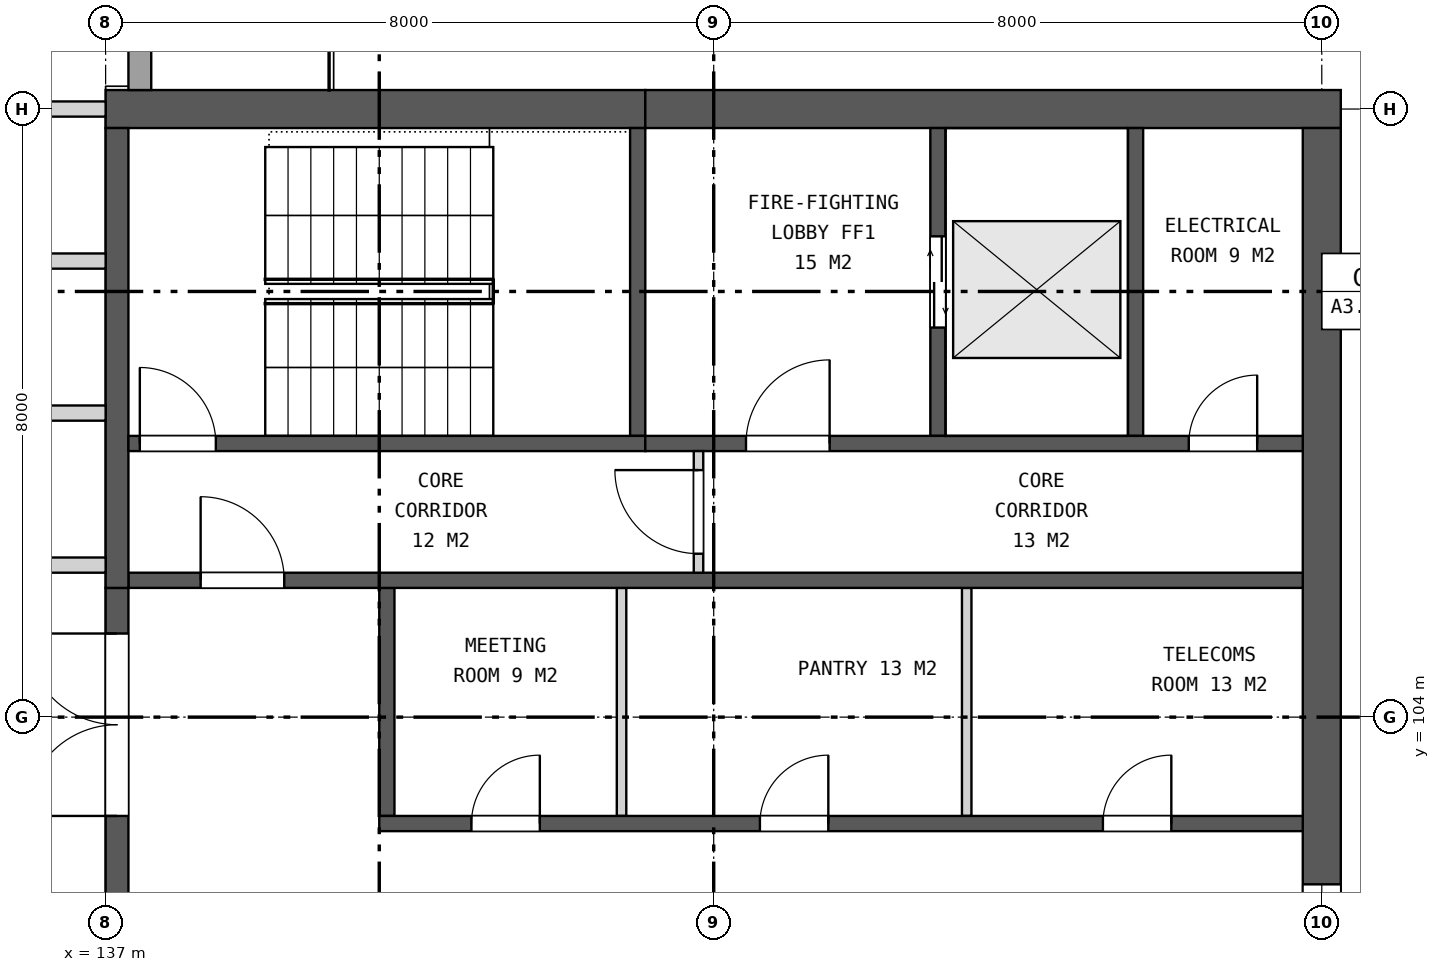
"""IFC4 building model, lengths in metres.
Left out: names, types, materials, properties, quantities, classifications, styles, units other than length and angle.
Written with IfcOpenShell. Run it as: python <this file> out.ifc"""

import sys

from ifc_helpers import new_model, si_unit, direction, frame, frame_2d, origin, place, context, subcontext, project, spatial, rectangle, extrude, element, fill, save


model = new_model("IFC4")
c1 = context("Model", 3, precision=1e-05, world=origin(), true_north=direction((0.0, 1.0)))
c2 = subcontext(c1, "Body", "Model", "MODEL_VIEW")
j1 = project(units=[si_unit("LENGTHUNIT", "METRE"), si_unit("PLANEANGLEUNIT", "RADIAN")], contexts=[c1])
p1 = place(None, origin())
s1 = spatial("IfcSite", under=j1, at=p1, CompositionType="ELEMENT")
p2 = place(p1, origin())
s2 = spatial("IfcBuilding", under=s1, at=p2, CompositionType="ELEMENT")
p3 = place(p2, frame((0.0, 0.0, 245.1)))
s3 = spatial("IfcBuildingStorey", under=s2, at=p3, CompositionType="ELEMENT", Elevation=245.1)
p4 = place(p3, frame((137.0, 112.0, 0.0), z_axis=(0.0, 0.0, 1.0), x_axis=(1.0, 0.0, 0.0)))
e1 = element("IfcWall", 1, at=p4, inside=s3, PredefinedType="SHEAR", context=c2, shape_type="SweptSolid", body=[
    extrude(rectangle(XDim=7.1, YDim=0.5, at=frame_2d((3.55, 0.0))), origin(), (0.0, 0.0, 1.0), 4.2),
])
p5 = place(p3, frame((144.1, 112.0, 0.0), z_axis=(0.0, 0.0, 1.0), x_axis=(1.0, 0.0, 0.0)))
e2 = element("IfcWall", 2, at=p5, inside=s3, PredefinedType="SHEAR", context=c2, shape_type="SweptSolid", body=[
    extrude(rectangle(XDim=9.15, YDim=0.5, at=frame_2d((4.575, 0.0))), origin(), (0.0, 0.0, 1.0), 4.2),
])
p6 = place(p3, frame((153.0, 88.25, 0.0), z_axis=(0.0, 0.0, 1.0), x_axis=(0.0, 1.0, 0.0)))
e3 = element("IfcWall", 3, at=p6, inside=s3, PredefinedType="SHEAR", context=c2, shape_type="SweptSolid", body=[
    extrude(rectangle(XDim=23.5, YDim=0.5, at=frame_2d((11.75, 0.0))), origin(), (0.0, 0.0, 1.0), 4.2),
])
p7 = place(p6, frame((9.95, 0.0, 0.15)))
e4 = element("IfcOpeningElement", 4, at=p7, cuts=e3, PredefinedType="OPENING", context=c2, shape_type="SweptSolid", body=[
    extrude(rectangle(XDim=3.6, YDim=3.0, at=frame_2d((1.8, 1.5))), frame((0.0, 0.26, 0.0), z_axis=(0.0, -1.0, 0.0), x_axis=(1.0, 0.0, 0.0)), (0.0, 0.0, 1.0), 0.52),
])
p8 = place(p3, frame((137.15, 94.3, 0.0), z_axis=(0.0, 0.0, 1.0), x_axis=(0.0, 1.0, 0.0)))
e5 = element("IfcWall", 5, at=p8, inside=s3, PredefinedType="SHEAR", context=c2, shape_type="SweptSolid", body=[
    extrude(rectangle(XDim=11.4, YDim=0.3, at=frame_2d((5.7, 0.0))), origin(), (0.0, 0.0, 1.0), 4.2),
])
p9 = place(p8, frame((0.6, 0.0, 0.0)))
e6 = element("IfcOpeningElement", 6, at=p9, cuts=e5, PredefinedType="OPENING", context=c2, shape_type="SweptSolid", body=[
    extrude(rectangle(XDim=2.4, YDim=2.4, at=frame_2d((1.2, 1.2))), frame((0.0, 0.16, 0.0), z_axis=(0.0, -1.0, 0.0), x_axis=(1.0, 0.0, 0.0)), (0.0, 0.0, 1.0), 0.32),
])
p10 = place(p8, frame((4.5, 0.0, 0.0)))
e7 = element("IfcOpeningElement", 7, at=p10, cuts=e5, PredefinedType="OPENING", context=c2, shape_type="SweptSolid", body=[
    extrude(rectangle(XDim=2.4, YDim=2.4, at=frame_2d((1.2, 1.2))), frame((0.0, 0.16, 0.0), z_axis=(0.0, -1.0, 0.0), x_axis=(1.0, 0.0, 0.0)), (0.0, 0.0, 1.0), 0.32),
])
p11 = place(p8, frame((8.4, 0.0, 0.0)))
e8 = element("IfcOpeningElement", 8, at=p11, cuts=e5, PredefinedType="OPENING", context=c2, shape_type="SweptSolid", body=[
    extrude(rectangle(XDim=2.4, YDim=2.4, at=frame_2d((1.2, 1.2))), frame((0.0, 0.16, 0.0), z_axis=(0.0, -1.0, 0.0), x_axis=(1.0, 0.0, 0.0)), (0.0, 0.0, 1.0), 0.32),
])
p12 = place(p3, frame((140.7, 102.7, 0.0), z_axis=(0.0, 0.0, 1.0), x_axis=(0.0, 1.0, 0.0)))
e9 = element("IfcWall", 9, at=p12, inside=s3, PredefinedType="SHEAR", context=c2, shape_type="SweptSolid", body=[
    extrude(rectangle(XDim=3.0, YDim=0.2, at=frame_2d((1.5, 0.0))), origin(), (0.0, 0.0, 1.0), 4.2),
])
for number, where, z_axis, x_axis in (
    (10, (143.788, 102.7, 0.0), (0.0, 0.0, 1.0), (0.0, 1.0, 0.0)),
    (11, (148.329, 102.7, 0.0), (0.0, 0.0, 1.0), (0.0, 1.0, 0.0)),
):
    element("IfcWall", number, at=place(p3, frame(where, z_axis=z_axis, x_axis=x_axis)), inside=s3, PredefinedType="PARTITIONING", context=c2, shape_type="SweptSolid", body=[
        extrude(rectangle(XDim=3.0, YDim=0.125, at=frame_2d((1.5, 0.0))), origin(), (0.0, 0.0, 1.0), 4.2),
    ])
p13 = place(p3, frame((140.6, 102.6, 0.0), z_axis=(0.0, 0.0, 1.0), x_axis=(1.0, 0.0, 0.0)))
e12 = element("IfcWall", 12, at=p13, inside=s3, PredefinedType="SHEAR", context=c2, shape_type="SweptSolid", body=[
    extrude(rectangle(XDim=12.15, YDim=0.2, at=frame_2d((6.075, 0.0))), origin(), (0.0, 0.0, 1.0), 4.2),
])
p14 = place(p13, frame((1.212, 0.0, 0.0)))
e13 = element("IfcOpeningElement", 13, at=p14, cuts=e12, PredefinedType="OPENING", context=c2, shape_type="SweptSolid", body=[
    extrude(rectangle(XDim=0.9, YDim=2.1, at=frame_2d((0.45, 1.05))), frame((0.0, 0.11, 0.0), z_axis=(0.0, -1.0, 0.0), x_axis=(1.0, 0.0, 0.0)), (0.0, 0.0, 1.0), 0.22),
])
p15 = place(p13, frame((5.008, 0.0, 0.0)))
e14 = element("IfcOpeningElement", 14, at=p15, cuts=e12, PredefinedType="OPENING", context=c2, shape_type="SweptSolid", body=[
    extrude(rectangle(XDim=0.9, YDim=2.1, at=frame_2d((0.45, 1.05))), frame((0.0, 0.11, 0.0), z_axis=(0.0, -1.0, 0.0), x_axis=(1.0, 0.0, 0.0)), (0.0, 0.0, 1.0), 0.22),
])
p16 = place(p13, frame((9.521, 0.0, 0.0)))
e15 = element("IfcOpeningElement", 15, at=p16, cuts=e12, PredefinedType="OPENING", context=c2, shape_type="SweptSolid", body=[
    extrude(rectangle(XDim=0.9, YDim=2.1, at=frame_2d((0.45, 1.05))), frame((0.0, 0.11, 0.0), z_axis=(0.0, -1.0, 0.0), x_axis=(1.0, 0.0, 0.0)), (0.0, 0.0, 1.0), 0.22),
])
p17 = place(p3, frame((137.3, 105.8, 0.0), z_axis=(0.0, 0.0, 1.0), x_axis=(1.0, 0.0, 0.0)))
e16 = element("IfcWall", 16, at=p17, inside=s3, PredefinedType="SHEAR", context=c2, shape_type="SweptSolid", body=[
    extrude(rectangle(XDim=15.45, YDim=0.2, at=frame_2d((7.725, 0.0))), origin(), (0.0, 0.0, 1.0), 4.2),
])
p18 = place(p17, frame((0.95, 0.0, 0.0)))
e17 = element("IfcOpeningElement", 17, at=p18, cuts=e16, PredefinedType="OPENING", context=c2, shape_type="SweptSolid", body=[
    extrude(rectangle(XDim=1.1, YDim=2.1, at=frame_2d((0.55, 1.05))), frame((0.0, 0.11, 0.0), z_axis=(0.0, -1.0, 0.0), x_axis=(1.0, 0.0, 0.0)), (0.0, 0.0, 1.0), 0.22),
])
p19 = place(p3, frame((137.15, 105.7, 0.0), z_axis=(0.0, 0.0, 1.0), x_axis=(0.0, 1.0, 0.0)))
e18 = element("IfcWall", 18, at=p19, inside=s3, PredefinedType="SHEAR", context=c2, shape_type="SweptSolid", body=[
    extrude(rectangle(XDim=6.05, YDim=0.3, at=frame_2d((3.025, 0.0))), origin(), (0.0, 0.0, 1.0), 4.2),
])
p20 = place(p3, frame((144.0, 107.7, 0.0), z_axis=(0.0, 0.0, 1.0), x_axis=(0.0, 1.0, 0.0)))
e19 = element("IfcWall", 19, at=p20, inside=s3, PredefinedType="SHEAR", context=c2, shape_type="SweptSolid", body=[
    extrude(rectangle(XDim=4.05, YDim=0.2, at=frame_2d((2.025, 0.0))), origin(), (0.0, 0.0, 1.0), 4.2),
])
p21 = place(p3, frame((147.95, 107.7, 0.0), z_axis=(0.0, 0.0, 1.0), x_axis=(0.0, 1.0, 0.0)))
e20 = element("IfcWall", 20, at=p21, inside=s3, PredefinedType="SHEAR", context=c2, shape_type="SweptSolid", body=[
    extrude(rectangle(XDim=4.05, YDim=0.2, at=frame_2d((2.025, 0.0))), origin(), (0.0, 0.0, 1.0), 4.2),
])
p22 = place(p21, frame((1.425, 0.0, 0.0)))
e21 = element("IfcOpeningElement", 21, at=p22, cuts=e20, PredefinedType="OPENING", context=c2, shape_type="SweptSolid", body=[
    extrude(rectangle(XDim=1.2, YDim=2.1, at=frame_2d((0.6, 1.05))), frame((0.0, 0.11, 0.0), z_axis=(0.0, -1.0, 0.0), x_axis=(1.0, 0.0, 0.0)), (0.0, 0.0, 1.0), 0.22),
])
p23 = place(p3, frame((150.55, 107.7, 0.0), z_axis=(0.0, 0.0, 1.0), x_axis=(0.0, 1.0, 0.0)))
e22 = element("IfcWall", 22, at=p23, inside=s3, PredefinedType="SHEAR", context=c2, shape_type="SweptSolid", body=[
    extrude(rectangle(XDim=4.05, YDim=0.2, at=frame_2d((2.025, 0.0))), origin(), (0.0, 0.0, 1.0), 4.2),
])
p24 = place(p3, frame((137.3, 107.6, 0.0), z_axis=(0.0, 0.0, 1.0), x_axis=(1.0, 0.0, 0.0)))
e23 = element("IfcWall", 23, at=p24, inside=s3, PredefinedType="SHEAR", context=c2, shape_type="SweptSolid", body=[
    extrude(rectangle(XDim=6.8, YDim=0.2, at=frame_2d((3.4, 0.0))), origin(), (0.0, 0.0, 1.0), 4.2),
])
p25 = place(p24, frame((0.15, 0.0, 0.0)))
e24 = element("IfcOpeningElement", 24, at=p25, cuts=e23, PredefinedType="OPENING", context=c2, shape_type="SweptSolid", body=[
    extrude(rectangle(XDim=1.0, YDim=2.1, at=frame_2d((0.5, 1.05))), frame((0.0, 0.11, 0.0), z_axis=(0.0, -1.0, 0.0), x_axis=(1.0, 0.0, 0.0)), (0.0, 0.0, 1.0), 0.22),
])
p26 = place(p3, frame((144.1, 107.6, 0.0), z_axis=(0.0, 0.0, 1.0), x_axis=(1.0, 0.0, 0.0)))
e25 = element("IfcWall", 25, at=p26, inside=s3, PredefinedType="SHEAR", context=c2, shape_type="SweptSolid", body=[
    extrude(rectangle(XDim=8.65, YDim=0.2, at=frame_2d((4.325, 0.0))), origin(), (0.0, 0.0, 1.0), 4.2),
])
p27 = place(p26, frame((1.325, 0.0, 0.0)))
e26 = element("IfcOpeningElement", 26, at=p27, cuts=e25, PredefinedType="OPENING", context=c2, shape_type="SweptSolid", body=[
    extrude(rectangle(XDim=1.1, YDim=2.1, at=frame_2d((0.55, 1.05))), frame((0.0, 0.11, 0.0), z_axis=(0.0, -1.0, 0.0), x_axis=(1.0, 0.0, 0.0)), (0.0, 0.0, 1.0), 0.22),
])
p28 = place(p26, frame((7.15, 0.0, 0.0)))
e27 = element("IfcOpeningElement", 27, at=p28, cuts=e25, PredefinedType="OPENING", context=c2, shape_type="SweptSolid", body=[
    extrude(rectangle(XDim=0.9, YDim=2.1, at=frame_2d((0.45, 1.05))), frame((0.0, 0.11, 0.0), z_axis=(0.0, -1.0, 0.0), x_axis=(1.0, 0.0, 0.0)), (0.0, 0.0, 1.0), 0.22),
])
p29 = place(p3, frame((144.8, 105.9, 0.0), z_axis=(0.0, 0.0, 1.0), x_axis=(0.0, 1.0, 0.0)))
e28 = element("IfcWall", 28, at=p29, inside=s3, PredefinedType="PARTITIONING", context=c2, shape_type="SweptSolid", body=[
    extrude(rectangle(XDim=1.6, YDim=0.125, at=frame_2d((0.8, 0.0))), origin(), (0.0, 0.0, 1.0), 4.2),
])
p30 = place(p29, frame((0.25, 0.0, 0.0)))
e29 = element("IfcOpeningElement", 29, at=p30, cuts=e28, PredefinedType="OPENING", context=c2, shape_type="SweptSolid", body=[
    extrude(rectangle(XDim=1.1, YDim=2.1, at=frame_2d((0.55, 1.05))), frame((0.0, 0.073, 0.0), z_axis=(0.0, -1.0, 0.0), x_axis=(1.0, 0.0, 0.0)), (0.0, 0.0, 1.0), 0.145),
])
p31 = place(p3, frame((137.45, 112.25, 0.0), z_axis=(0.0, 0.0, 1.0), x_axis=(0.0, 1.0, 0.0)))
e30 = element("IfcWall", 30, at=p31, inside=s3, PredefinedType="SOLIDWALL", context=c2, shape_type="SweptSolid", body=[
    extrude(rectangle(XDim=7.715, YDim=0.3, at=frame_2d((3.857, 0.0))), origin(), (0.0, 0.0, 1.0), 3.9),
])
p32 = place(p31, frame((2.55, 0.0, 0.0)))
e31 = element("IfcOpeningElement", 31, at=p32, cuts=e30, PredefinedType="OPENING", context=c2, shape_type="SweptSolid", body=[
    extrude(rectangle(XDim=2.4, YDim=2.4, at=frame_2d((1.2, 1.2))), frame((0.0, 0.16, 0.0), z_axis=(0.0, -1.0, 0.0), x_axis=(1.0, 0.0, 0.0)), (0.0, 0.0, 1.0), 0.32),
])
for number, where, z_axis, x_axis in (
    (32, (131.5, 106.0, 0.0), (0.0, 0.0, 1.0), (1.0, 0.0, 0.0)),
    (33, (131.5, 108.0, 0.0), (0.0, 0.0, 1.0), (1.0, 0.0, 0.0)),
    (34, (131.5, 110.0, 0.0), (0.0, 0.0, 1.0), (1.0, 0.0, 0.0)),
    (35, (131.5, 112.0, 0.0), (0.0, 0.0, 1.0), (1.0, 0.0, 0.0)),
):
    element("IfcWall", number, at=place(p3, frame(where, z_axis=z_axis, x_axis=x_axis)), inside=s3, PredefinedType="SOLIDWALL", context=c2, shape_type="SweptSolid", body=[
        extrude(rectangle(XDim=5.5, YDim=0.2, at=frame_2d((2.75, 0.0))), origin(), (0.0, 0.0, 1.0), 3.443),
    ])
p33 = place(p7, origin())
e36 = element("IfcWindow", 36, at=p33, inside=s3, PartitioningType="SINGLE_PANEL", PredefinedType="WINDOW", context=c2, shape_type="SweptSolid", body=[
    extrude(rectangle(XDim=3.6, YDim=3.0, at=frame_2d((1.8, 1.5))), frame((0.0, 0.03, 0.0), z_axis=(0.0, -1.0, 0.0), x_axis=(1.0, 0.0, 0.0)), (0.0, 0.0, 1.0), 0.06),
])
fill(e4, e36)
p34 = place(p11, origin())
e37 = element("IfcDoor", 37, at=p34, inside=s3, OperationType="DOUBLE_DOOR_SINGLE_SWING", PredefinedType="DOOR", context=c2, shape_type="SweptSolid", body=[
    extrude(rectangle(XDim=2.4, YDim=2.4, at=frame_2d((1.2, 1.2))), frame((0.0, 0.025, 0.0), z_axis=(0.0, -1.0, 0.0), x_axis=(1.0, 0.0, 0.0)), (0.0, 0.0, 1.0), 0.05),
])
fill(e8, e37)
p35 = place(p14, origin())
e38 = element("IfcDoor", 38, at=p35, inside=s3, OperationType="SINGLE_SWING_RIGHT", PredefinedType="DOOR", context=c2, shape_type="SweptSolid", body=[
    extrude(rectangle(XDim=0.9, YDim=2.1, at=frame_2d((0.45, 1.05))), frame((0.0, 0.025, 0.0), z_axis=(0.0, -1.0, 0.0), x_axis=(1.0, 0.0, 0.0)), (0.0, 0.0, 1.0), 0.05),
])
fill(e13, e38)
p36 = place(p15, origin())
e39 = element("IfcDoor", 39, at=p36, inside=s3, OperationType="SINGLE_SWING_RIGHT", PredefinedType="DOOR", context=c2, shape_type="SweptSolid", body=[
    extrude(rectangle(XDim=0.9, YDim=2.1, at=frame_2d((0.45, 1.05))), frame((0.0, 0.025, 0.0), z_axis=(0.0, -1.0, 0.0), x_axis=(1.0, 0.0, 0.0)), (0.0, 0.0, 1.0), 0.05),
])
fill(e14, e39)
p37 = place(p16, origin())
e40 = element("IfcDoor", 40, at=p37, inside=s3, OperationType="SINGLE_SWING_RIGHT", PredefinedType="DOOR", context=c2, shape_type="SweptSolid", body=[
    extrude(rectangle(XDim=0.9, YDim=2.1, at=frame_2d((0.45, 1.05))), frame((0.0, 0.025, 0.0), z_axis=(0.0, -1.0, 0.0), x_axis=(1.0, 0.0, 0.0)), (0.0, 0.0, 1.0), 0.05),
])
fill(e15, e40)
p38 = place(p18, origin())
e41 = element("IfcDoor", 41, at=p38, inside=s3, OperationType="SINGLE_SWING_LEFT", PredefinedType="DOOR", context=c2, shape_type="SweptSolid", body=[
    extrude(rectangle(XDim=1.1, YDim=2.1, at=frame_2d((0.55, 1.05))), frame((0.0, 0.025, 0.0), z_axis=(0.0, -1.0, 0.0), x_axis=(1.0, 0.0, 0.0)), (0.0, 0.0, 1.0), 0.05),
])
fill(e17, e41)
p39 = place(p22, origin())
e42 = element("IfcDoor", 42, at=p39, inside=s3, OperationType="DOUBLE_DOOR_SLIDING", PredefinedType="DOOR", context=c2, shape_type="SweptSolid", body=[
    extrude(rectangle(XDim=1.2, YDim=2.1, at=frame_2d((0.6, 1.05))), frame((0.0, 0.025, 0.0), z_axis=(0.0, -1.0, 0.0), x_axis=(1.0, 0.0, 0.0)), (0.0, 0.0, 1.0), 0.05),
])
fill(e21, e42)
p40 = place(p25, origin())
e43 = element("IfcDoor", 43, at=p40, inside=s3, OperationType="SINGLE_SWING_LEFT", PredefinedType="DOOR", context=c2, shape_type="SweptSolid", body=[
    extrude(rectangle(XDim=1.0, YDim=2.1, at=frame_2d((0.5, 1.05))), frame((0.0, 0.025, 0.0), z_axis=(0.0, -1.0, 0.0), x_axis=(1.0, 0.0, 0.0)), (0.0, 0.0, 1.0), 0.05),
])
fill(e24, e43)
p41 = place(p27, origin())
e44 = element("IfcDoor", 44, at=p41, inside=s3, OperationType="SINGLE_SWING_RIGHT", PredefinedType="DOOR", context=c2, shape_type="SweptSolid", body=[
    extrude(rectangle(XDim=1.1, YDim=2.1, at=frame_2d((0.55, 1.05))), frame((0.0, 0.025, 0.0), z_axis=(0.0, -1.0, 0.0), x_axis=(1.0, 0.0, 0.0)), (0.0, 0.0, 1.0), 0.05),
])
fill(e26, e44)
p42 = place(p28, origin())
e45 = element("IfcDoor", 45, at=p42, inside=s3, OperationType="SINGLE_SWING_RIGHT", PredefinedType="DOOR", context=c2, shape_type="SweptSolid", body=[
    extrude(rectangle(XDim=0.9, YDim=2.1, at=frame_2d((0.45, 1.05))), frame((0.0, 0.025, 0.0), z_axis=(0.0, -1.0, 0.0), x_axis=(1.0, 0.0, 0.0)), (0.0, 0.0, 1.0), 0.05),
])
fill(e27, e45)
p43 = place(p30, origin())
e46 = element("IfcDoor", 46, at=p43, inside=s3, OperationType="SINGLE_SWING_RIGHT", PredefinedType="DOOR", context=c2, shape_type="SweptSolid", body=[
    extrude(rectangle(XDim=1.1, YDim=2.1, at=frame_2d((0.55, 1.05))), frame((0.0, 0.025, 0.0), z_axis=(0.0, -1.0, 0.0), x_axis=(1.0, 0.0, 0.0)), (0.0, 0.0, 1.0), 0.05),
])
fill(e29, e46)
save(model, sys.argv[1])
